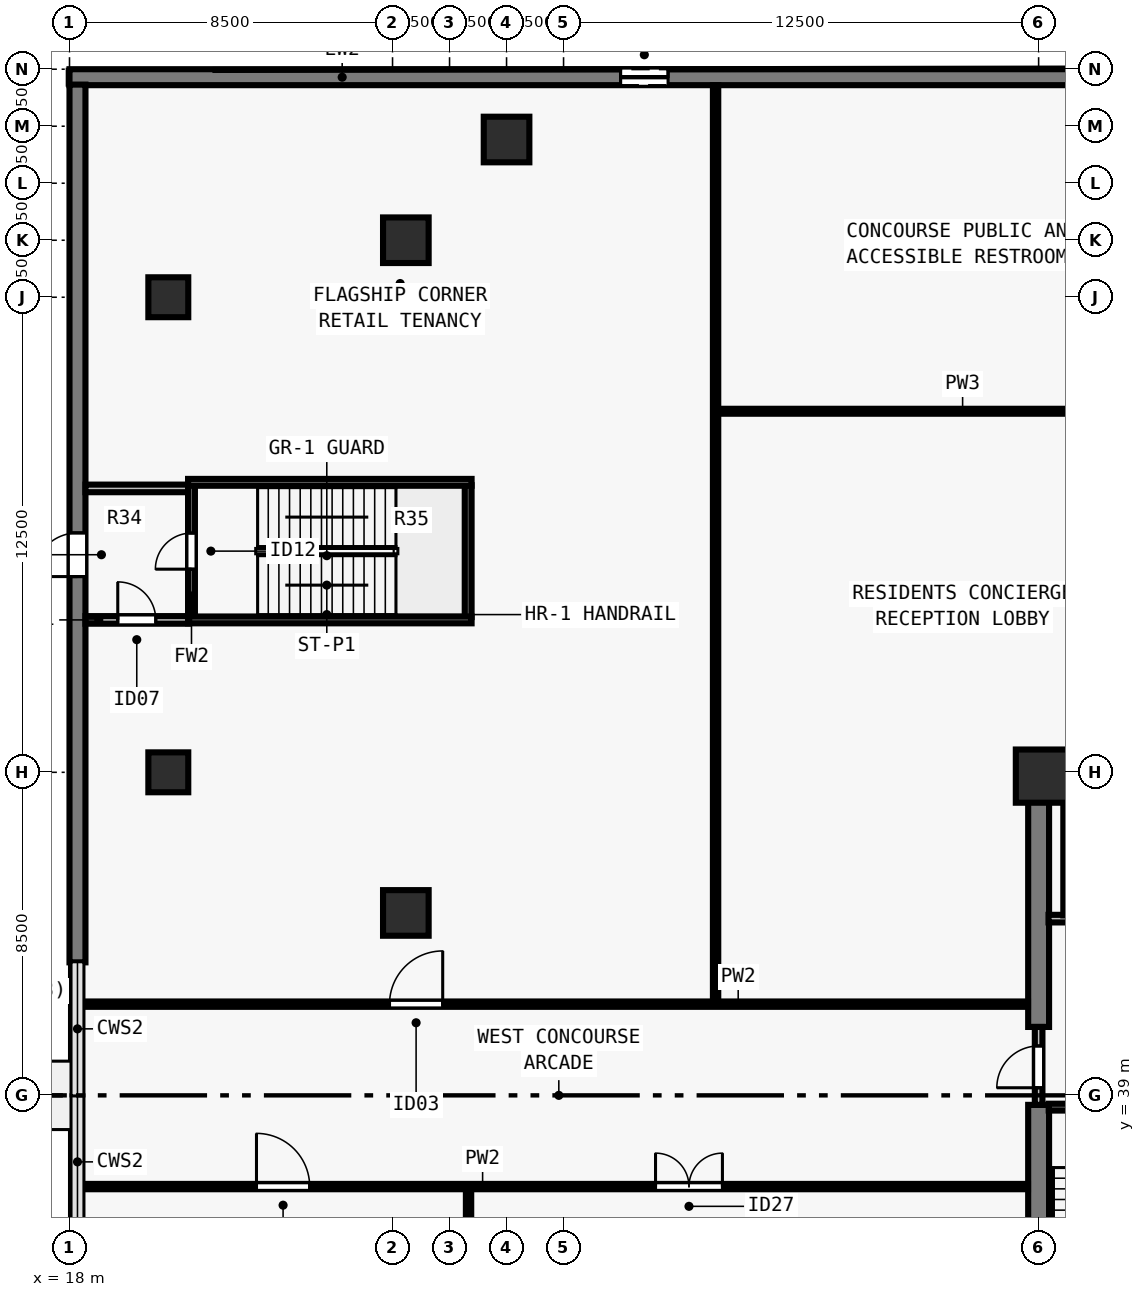
"""IFC4 building model, lengths in metres.
Left out: names, types, materials, properties, quantities, classifications, styles, units other than length and angle.
Written with IfcOpenShell. Run it as: python <this file> out.ifc"""

import sys

from ifc_helpers import new_model, si_unit, direction, frame, frame_2d, origin, origin_2d, place, context, subcontext, project, spatial, rectangle, extrude, element, fill, save


model = new_model("IFC4")
c1 = context("Model", 3, precision=1e-05, world=origin(), true_north=direction((0.0, 1.0)))
c2 = subcontext(c1, "Body", "Model", "MODEL_VIEW")
j1 = project(units=[si_unit("LENGTHUNIT", "METRE"), si_unit("PLANEANGLEUNIT", "RADIAN")], contexts=[c1])
p1 = place(None, origin())
s1 = spatial("IfcSite", under=j1, at=p1, CompositionType="ELEMENT")
p2 = place(p1, origin())
s2 = spatial("IfcBuilding", under=s1, at=p2, CompositionType="ELEMENT")
p3 = place(p2, origin())
s3 = spatial("IfcBuildingStorey", under=s2, at=p3, CompositionType="ELEMENT", Elevation=0.0)
p4 = place(p3, frame((43.6, 47.4, 0.0), z_axis=(0.0, 0.0, 1.0), x_axis=(1.0, 0.0, 0.0)))
e1 = element("IfcColumn", 1, at=p4, inside=s3, PredefinedType="COLUMN", context=c2, shape_type="SweptSolid", body=[
    extrude(rectangle(XDim=1.4, YDim=1.4, at=origin_2d()), origin(), (0.0, 0.0, 1.0), 5.0),
])
for number, where, z_axis, x_axis in (
    (2, (29.5, 64.15, 0.0), (0.0, 0.0, 1.0), (1.0, 0.0, 0.0)),
    (3, (26.85, 61.5, 0.0), (0.0, 0.0, 1.0), (1.0, 0.0, 0.0)),
    (4, (26.85, 43.8, 0.0), (0.0, 0.0, 1.0), (1.0, 0.0, 0.0)),
):
    element("IfcColumn", number, at=place(p3, frame(where, z_axis=z_axis, x_axis=x_axis)), inside=s3, PredefinedType="COLUMN", context=c2, shape_type="SweptSolid", body=[
        extrude(rectangle(XDim=1.2, YDim=1.2, at=origin_2d()), origin(), (0.0, 0.0, 1.0), 5.0),
    ])
for number, where, z_axis, x_axis in (
    (5, (20.6, 47.5, 0.0), (0.0, 0.0, 1.0), (1.0, 0.0, 0.0)),
    (6, (20.6, 60.0, 0.0), (0.0, 0.0, 1.0), (1.0, 0.0, 0.0)),
):
    element("IfcColumn", number, at=place(p3, frame(where, z_axis=z_axis, x_axis=x_axis)), inside=s3, PredefinedType="COLUMN", context=c2, shape_type="SweptSolid", body=[
        extrude(rectangle(XDim=1.05, YDim=1.05, at=origin_2d()), origin(), (0.0, 0.0, 1.0), 5.0),
    ])
p5 = place(p3, frame((18.0, 65.79, 0.0), z_axis=(0.0, 0.0, 1.0), x_axis=(1.0, 0.0, 0.0)))
e7 = element("IfcWall", 7, at=p5, inside=s3, PredefinedType="SOLIDWALL", context=c2, shape_type="SweptSolid", body=[
    extrude(rectangle(XDim=30.2, YDim=0.42, at=frame_2d((15.1, 0.0))), origin(), (0.0, 0.0, 1.0), 4.7),
])
p6 = place(p5, frame((14.5, 0.0, 0.0)))
e8 = element("IfcOpeningElement", 8, at=p6, cuts=e7, PredefinedType="OPENING", context=c2, shape_type="SweptSolid", body=[
    extrude(rectangle(XDim=1.25, YDim=2.15, at=frame_2d((0.625, 1.075))), frame((0.0, 0.22, 0.0), z_axis=(0.0, -1.0, 0.0), x_axis=(1.0, 0.0, 0.0)), (0.0, 0.0, 1.0), 0.44),
])
p7 = place(p3, frame((18.21, 42.5, 0.0), z_axis=(0.0, 0.0, 1.0), x_axis=(0.0, 1.0, 0.0)))
e9 = element("IfcWall", 9, at=p7, inside=s3, PredefinedType="SOLIDWALL", context=c2, shape_type="SweptSolid", body=[
    extrude(rectangle(XDim=23.095, YDim=0.42, at=frame_2d((11.547, 0.0))), origin(), (0.0, 0.0, 1.0), 4.7),
])
p8 = place(p7, frame((10.15, 0.0, 0.0)))
e10 = element("IfcOpeningElement", 10, at=p8, cuts=e9, PredefinedType="OPENING", context=c2, shape_type="SweptSolid", body=[
    extrude(rectangle(XDim=1.15, YDim=2.15, at=frame_2d((0.575, 1.075))), frame((0.0, 0.22, 0.0), z_axis=(0.0, -1.0, 0.0), x_axis=(1.0, 0.0, 0.0)), (0.0, 0.0, 1.0), 0.44),
])
p9 = place(p3, frame((43.225, 47.5, 0.0), z_axis=(0.0, 0.0, 1.0), x_axis=(1.0, 0.0, 0.0)))
e11 = element("IfcWall", 11, at=p9, inside=s3, PredefinedType="SHEAR", context=c2, shape_type="SweptSolid", body=[
    extrude(rectangle(XDim=17.55, YDim=0.55, at=frame_2d((8.775, 0.0))), origin(), (0.0, 0.0, 1.0), 4.7),
])
p10 = place(p3, frame((43.5, 30.765, 0.0), z_axis=(0.0, 0.0, 1.0), x_axis=(0.0, 1.0, 0.0)))
e12 = element("IfcWall", 12, at=p10, inside=s3, PredefinedType="SHEAR", context=c2, shape_type="SweptSolid", body=[
    extrude(rectangle(XDim=7.985, YDim=0.55, at=frame_2d((3.993, 0.0))), origin(), (0.0, 0.0, 1.0), 4.7),
])
p11 = place(p3, frame((43.5, 40.8, 0.0), z_axis=(0.0, 0.0, 1.0), x_axis=(0.0, 1.0, 0.0)))
e13 = element("IfcWall", 13, at=p11, inside=s3, PredefinedType="SHEAR", context=c2, shape_type="SweptSolid", body=[
    extrude(rectangle(XDim=6.435, YDim=0.55, at=frame_2d((3.218, 0.0))), origin(), (0.0, 0.0, 1.0), 4.7),
])
p12 = place(p3, frame((43.5, 38.75, 0.0), z_axis=(0.0, 0.0, 1.0), x_axis=(0.0, 1.0, 0.0)))
e14 = element("IfcWall", 14, at=p12, inside=s3, PredefinedType="SOLIDWALL", context=c2, shape_type="SweptSolid", body=[
    extrude(rectangle(XDim=2.05, YDim=0.2, at=frame_2d((1.025, 0.0))), origin(), (0.0, 0.0, 1.0), 4.7),
])
p13 = place(p12, frame((0.45, 0.0, 0.0)))
e15 = element("IfcOpeningElement", 15, at=p13, cuts=e14, PredefinedType="OPENING", context=c2, shape_type="SweptSolid", body=[
    extrude(rectangle(XDim=1.1, YDim=2.15, at=frame_2d((0.55, 1.075))), frame((0.0, 0.11, 0.0), z_axis=(0.0, -1.0, 0.0), x_axis=(1.0, 0.0, 0.0)), (0.0, 0.0, 1.0), 0.22),
])
p14 = place(p3, frame((43.76, 43.65, 0.0), z_axis=(0.0, 0.0, 1.0), x_axis=(1.0, 0.0, 0.0)))
e16 = element("IfcWall", 16, at=p14, inside=s3, PredefinedType="SOLIDWALL", context=c2, shape_type="SweptSolid", body=[
    extrude(rectangle(XDim=3.505, YDim=0.2, at=frame_2d((1.752, 0.0))), origin(), (0.0, 0.0, 1.0), 4.7),
])
p15 = place(p14, frame((1.11, 0.0, 0.0)))
e17 = element("IfcOpeningElement", 17, at=p15, cuts=e16, PredefinedType="OPENING", context=c2, shape_type="SweptSolid", body=[
    extrude(rectangle(XDim=1.1, YDim=2.2, at=frame_2d((0.55, 1.1))), frame((0.0, 0.11, 0.0), z_axis=(0.0, -1.0, 0.0), x_axis=(1.0, 0.0, 0.0)), (0.0, 0.0, 1.0), 0.22),
])
p16 = place(p3, frame((44.25, 43.735, 0.0), z_axis=(0.0, 0.0, 1.0), x_axis=(0.0, 1.0, 0.0)))
e18 = element("IfcWall", 18, at=p16, inside=s3, PredefinedType="SOLIDWALL", context=c2, shape_type="SweptSolid", body=[
    extrude(rectangle(XDim=3.505, YDim=0.2, at=frame_2d((1.752, 0.0))), origin(), (0.0, 0.0, 1.0), 4.7),
])
p17 = place(p3, frame((18.42, 36.6, 0.0), z_axis=(0.0, 0.0, 1.0), x_axis=(1.0, 0.0, 0.0)))
e19 = element("IfcWall", 19, at=p17, inside=s3, PredefinedType="PARTITIONING", context=c2, shape_type="SweptSolid", body=[
    extrude(rectangle(XDim=24.8, YDim=0.14, at=frame_2d((12.4, 0.0))), origin(), (0.0, 0.0, 1.0), 4.7),
])
p18 = place(p17, frame((4.5, 0.0, 0.0)))
e20 = element("IfcOpeningElement", 20, at=p18, cuts=e19, PredefinedType="OPENING", context=c2, shape_type="SweptSolid", body=[
    extrude(rectangle(XDim=1.4, YDim=2.2, at=frame_2d((0.7, 1.1))), frame((0.0, 0.08, 0.0), z_axis=(0.0, -1.0, 0.0), x_axis=(1.0, 0.0, 0.0)), (0.0, 0.0, 1.0), 0.16),
])
p19 = place(p17, frame((15.0, 0.0, 0.0)))
e21 = element("IfcOpeningElement", 21, at=p19, cuts=e19, PredefinedType="OPENING", context=c2, shape_type="SweptSolid", body=[
    extrude(rectangle(XDim=1.76, YDim=2.2, at=frame_2d((0.88, 1.1))), frame((0.0, 0.08, 0.0), z_axis=(0.0, -1.0, 0.0), x_axis=(1.0, 0.0, 0.0)), (0.0, 0.0, 1.0), 0.16),
])
p20 = place(p3, frame((18.42, 41.4, 0.0), z_axis=(0.0, 0.0, 1.0), x_axis=(1.0, 0.0, 0.0)))
e22 = element("IfcWall", 22, at=p20, inside=s3, PredefinedType="PARTITIONING", context=c2, shape_type="SweptSolid", body=[
    extrude(rectangle(XDim=24.8, YDim=0.14, at=frame_2d((12.4, 0.0))), origin(), (0.0, 0.0, 1.0), 4.7),
])
p21 = place(p20, frame((8.0, 0.0, 0.0)))
e23 = element("IfcOpeningElement", 23, at=p21, cuts=e22, PredefinedType="OPENING", context=c2, shape_type="SweptSolid", body=[
    extrude(rectangle(XDim=1.4, YDim=2.2, at=frame_2d((0.7, 1.1))), frame((0.0, 0.08, 0.0), z_axis=(0.0, -1.0, 0.0), x_axis=(1.0, 0.0, 0.0)), (0.0, 0.0, 1.0), 0.16),
])
p22 = place(p3, frame((28.5, 21.085, 0.0), z_axis=(0.0, 0.0, 1.0), x_axis=(0.0, 1.0, 0.0)))
e24 = element("IfcWall", 24, at=p22, inside=s3, PredefinedType="PARTITIONING", context=c2, shape_type="SweptSolid", body=[
    extrude(rectangle(XDim=15.46, YDim=0.14, at=frame_2d((7.73, 0.0))), origin(), (0.0, 0.0, 1.0), 4.7),
])
p23 = place(p3, frame((18.42, 51.51, 0.0), z_axis=(0.0, 0.0, 1.0), x_axis=(1.0, 0.0, 0.0)))
e25 = element("IfcWall", 25, at=p23, inside=s3, PredefinedType="SOLIDWALL", context=c2, shape_type="SweptSolid", body=[
    extrude(rectangle(XDim=2.7, YDim=0.2, at=frame_2d((1.35, 0.0))), origin(), (0.0, 0.0, 1.0), 4.7),
])
p24 = place(p23, frame((0.85, 0.0, 0.0)))
e26 = element("IfcOpeningElement", 26, at=p24, cuts=e25, PredefinedType="OPENING", context=c2, shape_type="SweptSolid", body=[
    extrude(rectangle(XDim=1.0, YDim=2.15, at=frame_2d((0.5, 1.075))), frame((0.0, 0.11, 0.0), z_axis=(0.0, -1.0, 0.0), x_axis=(1.0, 0.0, 0.0)), (0.0, 0.0, 1.0), 0.22),
])
p25 = place(p3, frame((18.42, 54.97, 0.0), z_axis=(0.0, 0.0, 1.0), x_axis=(1.0, 0.0, 0.0)))
e27 = element("IfcWall", 27, at=p25, inside=s3, PredefinedType="SOLIDWALL", context=c2, shape_type="SweptSolid", body=[
    extrude(rectangle(XDim=2.7, YDim=0.2, at=frame_2d((1.35, 0.0))), origin(), (0.0, 0.0, 1.0), 4.7),
])
p26 = place(p3, frame((35.0, 41.455, 0.0), z_axis=(0.0, 0.0, 1.0), x_axis=(0.0, 1.0, 0.0)))
e28 = element("IfcWall", 28, at=p26, inside=s3, PredefinedType="PARTITIONING", context=c2, shape_type="SweptSolid", body=[
    extrude(rectangle(XDim=24.125, YDim=0.14, at=frame_2d((12.062, 0.0))), origin(), (0.0, 0.0, 1.0), 3.751),
])
p27 = place(p3, frame((35.055, 57.0, 0.0), z_axis=(0.0, 0.0, 1.0), x_axis=(1.0, 0.0, 0.0)))
e29 = element("IfcWall", 29, at=p27, inside=s3, PredefinedType="PLUMBINGWALL", context=c2, shape_type="SweptSolid", body=[
    extrude(rectangle(XDim=12.89, YDim=0.13, at=frame_2d((6.445, 0.0))), origin(), (0.0, 0.0, 1.0), 4.7),
])
p28 = place(p3, frame((43.765, 38.69, 0.0), z_axis=(0.0, 0.0, 1.0), x_axis=(1.0, 0.0, 0.0)))
e30 = element("IfcWall", 30, at=p28, inside=s3, PredefinedType="SOLIDWALL", context=c2, shape_type="SweptSolid", body=[
    extrude(rectangle(XDim=3.23, YDim=0.18, at=frame_2d((1.615, 0.0))), origin(), (0.0, 0.0, 1.0), 4.7),
])
p29 = place(p28, frame((1.14, 0.0, 0.0)))
e31 = element("IfcOpeningElement", 31, at=p29, cuts=e30, PredefinedType="OPENING", context=c2, shape_type="SweptSolid", body=[
    extrude(rectangle(XDim=0.95, YDim=2.15, at=frame_2d((0.475, 1.075))), frame((0.0, 0.1, 0.0), z_axis=(0.0, -1.0, 0.0), x_axis=(1.0, 0.0, 0.0)), (0.0, 0.0, 1.0), 0.2),
])
p30 = place(p3, frame((21.21, 51.585, 0.0), z_axis=(0.0, 0.0, 1.0), x_axis=(0.0, 1.0, 0.0)))
e32 = element("IfcWall", 32, at=p30, inside=s3, PredefinedType="SOLIDWALL", context=c2, shape_type="SweptSolid", body=[
    extrude(rectangle(XDim=3.47, YDim=0.18, at=frame_2d((1.735, 0.0))), origin(), (0.0, 0.0, 1.0), 4.7),
])
p31 = place(p30, frame((1.26, 0.0, 0.0)))
e33 = element("IfcOpeningElement", 33, at=p31, cuts=e32, PredefinedType="OPENING", context=c2, shape_type="SweptSolid", body=[
    extrude(rectangle(XDim=0.95, YDim=2.15, at=frame_2d((0.475, 1.075))), frame((0.0, 0.1, 0.0), z_axis=(0.0, -1.0, 0.0), x_axis=(1.0, 0.0, 0.0)), (0.0, 0.0, 1.0), 0.2),
])
p32 = place(p3, frame((28.49, 51.585, 0.0), z_axis=(0.0, 0.0, 1.0), x_axis=(0.0, 1.0, 0.0)))
e34 = element("IfcWall", 34, at=p32, inside=s3, PredefinedType="SOLIDWALL", context=c2, shape_type="SweptSolid", body=[
    extrude(rectangle(XDim=3.47, YDim=0.18, at=frame_2d((1.735, 0.0))), origin(), (0.0, 0.0, 1.0), 4.7),
])
for number, where, z_axis, x_axis in (
    (35, (21.12, 51.51, 0.0), (0.0, 0.0, 1.0), (1.0, 0.0, 0.0)),
    (36, (21.12, 55.13, 0.0), (0.0, 0.0, 1.0), (1.0, 0.0, 0.0)),
):
    element("IfcWall", number, at=place(p3, frame(where, z_axis=z_axis, x_axis=x_axis)), inside=s3, PredefinedType="SOLIDWALL", context=c2, shape_type="SweptSolid", body=[
        extrude(rectangle(XDim=7.46, YDim=0.18, at=frame_2d((3.73, 0.0))), origin(), (0.0, 0.0, 1.0), 4.7),
    ])
p33 = place(p8, origin())
e37 = element("IfcDoor", 37, at=p33, inside=s3, OperationType="SINGLE_SWING_LEFT", PredefinedType="DOOR", context=c2, shape_type="SweptSolid", body=[
    extrude(rectangle(XDim=1.15, YDim=2.15, at=frame_2d((0.575, 1.075))), frame((0.0, 0.025, 0.0), z_axis=(0.0, -1.0, 0.0), x_axis=(1.0, 0.0, 0.0)), (0.0, 0.0, 1.0), 0.05),
])
fill(e10, e37)
p34 = place(p6, origin())
e38 = element("IfcDoor", 38, at=p34, inside=s3, OperationType="SINGLE_SWING_LEFT", PredefinedType="GATE", context=c2, shape_type="SweptSolid", body=[
    extrude(rectangle(XDim=1.25, YDim=2.15, at=frame_2d((0.625, 1.075))), frame((0.0, 0.025, 0.0), z_axis=(0.0, -1.0, 0.0), x_axis=(1.0, 0.0, 0.0)), (0.0, 0.0, 1.0), 0.05),
])
fill(e8, e38)
p35 = place(p13, origin())
e39 = element("IfcDoor", 39, at=p35, inside=s3, OperationType="SINGLE_SWING_LEFT", PredefinedType="DOOR", context=c2, shape_type="SweptSolid", body=[
    extrude(rectangle(XDim=1.1, YDim=2.15, at=frame_2d((0.55, 1.075))), frame((0.0, 0.025, 0.0), z_axis=(0.0, -1.0, 0.0), x_axis=(1.0, 0.0, 0.0)), (0.0, 0.0, 1.0), 0.05),
])
fill(e15, e39)
p36 = place(p18, origin())
e40 = element("IfcDoor", 40, at=p36, inside=s3, OperationType="SINGLE_SWING_LEFT", PredefinedType="DOOR", context=c2, shape_type="SweptSolid", body=[
    extrude(rectangle(XDim=1.4, YDim=2.2, at=frame_2d((0.7, 1.1))), frame((0.0, 0.025, 0.0), z_axis=(0.0, -1.0, 0.0), x_axis=(1.0, 0.0, 0.0)), (0.0, 0.0, 1.0), 0.05),
])
fill(e20, e40)
p37 = place(p19, origin())
e41 = element("IfcDoor", 41, at=p37, inside=s3, OperationType="DOUBLE_DOOR_SINGLE_SWING", PredefinedType="DOOR", context=c2, shape_type="SweptSolid", body=[
    extrude(rectangle(XDim=1.76, YDim=2.2, at=frame_2d((0.88, 1.1))), frame((0.0, 0.025, 0.0), z_axis=(0.0, -1.0, 0.0), x_axis=(1.0, 0.0, 0.0)), (0.0, 0.0, 1.0), 0.05),
])
fill(e21, e41)
p38 = place(p24, origin())
e42 = element("IfcDoor", 42, at=p38, inside=s3, OperationType="SINGLE_SWING_LEFT", PredefinedType="DOOR", context=c2, shape_type="SweptSolid", body=[
    extrude(rectangle(XDim=1.0, YDim=2.15, at=frame_2d((0.5, 1.075))), frame((0.0, 0.025, 0.0), z_axis=(0.0, -1.0, 0.0), x_axis=(1.0, 0.0, 0.0)), (0.0, 0.0, 1.0), 0.05),
])
fill(e26, e42)
p39 = place(p21, origin())
e43 = element("IfcDoor", 43, at=p39, inside=s3, OperationType="SINGLE_SWING_RIGHT", PredefinedType="DOOR", context=c2, shape_type="SweptSolid", body=[
    extrude(rectangle(XDim=1.4, YDim=2.2, at=frame_2d((0.7, 1.1))), frame((0.0, 0.025, 0.0), z_axis=(0.0, -1.0, 0.0), x_axis=(1.0, 0.0, 0.0)), (0.0, 0.0, 1.0), 0.05),
])
fill(e23, e43)
p40 = place(p31, origin())
e44 = element("IfcDoor", 44, at=p40, inside=s3, OperationType="SINGLE_SWING_LEFT", PredefinedType="DOOR", context=c2, shape_type="SweptSolid", body=[
    extrude(rectangle(XDim=0.95, YDim=2.15, at=frame_2d((0.475, 1.075))), frame((0.0, 0.025, 0.0), z_axis=(0.0, -1.0, 0.0), x_axis=(1.0, 0.0, 0.0)), (0.0, 0.0, 1.0), 0.05),
])
fill(e33, e44)
save(model, sys.argv[1])
